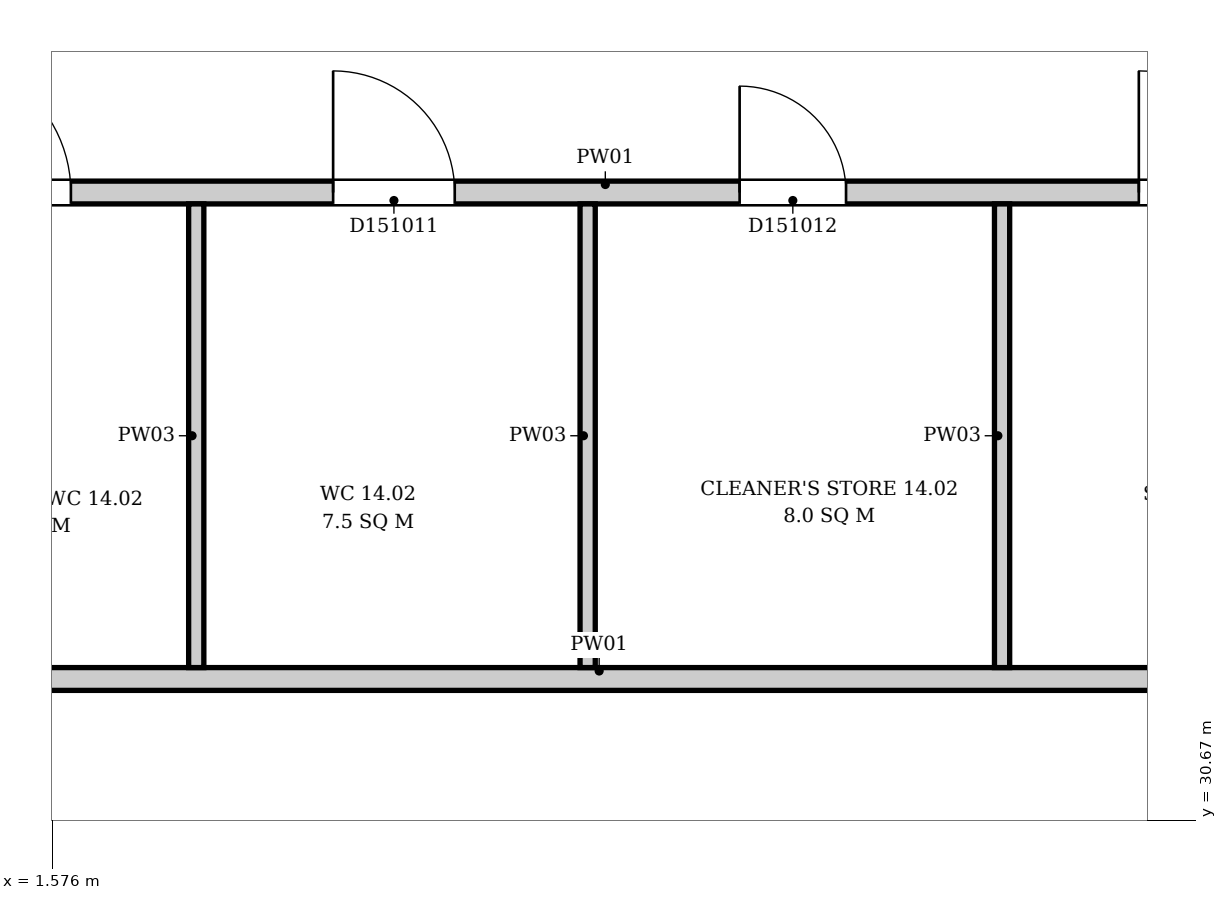
"""IFC4 building model, lengths in metres.
Left out: names, types, materials, properties, quantities, classifications, styles, units other than length and angle.
Written with IfcOpenShell. Run it as: python <this file> out.ifc"""

import sys

from ifc_helpers import new_model, si_unit, direction, frame, frame_2d, origin, place, context, subcontext, project, spatial, rectangle, extrude, element, fill, save


model = new_model("IFC4")
c1 = context("Model", 3, precision=1e-05, world=origin(), true_north=direction((0.0, 1.0)))
c2 = subcontext(c1, "Body", "Model", "MODEL_VIEW")
j1 = project(units=[si_unit("LENGTHUNIT", "METRE"), si_unit("PLANEANGLEUNIT", "RADIAN")], contexts=[c1])
p1 = place(None, origin())
s1 = spatial("IfcSite", under=j1, at=p1, CompositionType="ELEMENT")
p2 = place(p1, origin())
s2 = spatial("IfcBuilding", under=s1, at=p2, CompositionType="ELEMENT")
p3 = place(p2, frame((0.0, 0.0, 69.7)))
s3 = spatial("IfcBuildingStorey", under=s2, at=p3, CompositionType="ELEMENT", Elevation=69.7)
p4 = place(p3, frame((-0.044, 31.6, 0.0), z_axis=(0.0, 0.0, 1.0), x_axis=(1.0, 0.0, 0.0)))
e1 = element("IfcWall", 1, at=p4, inside=s3, PredefinedType="PARTITIONING", context=c2, shape_type="SweptSolid", body=[
    extrude(rectangle(XDim=10.438, YDim=0.15, at=frame_2d((5.219, 0.0))), origin(), (0.0, 0.0, 1.0), 3.9),
])
p5 = place(p3, frame((-0.044, 34.8, 0.0), z_axis=(0.0, 0.0, 1.0), x_axis=(1.0, 0.0, 0.0)))
e2 = element("IfcWall", 2, at=p5, inside=s3, PredefinedType="PARTITIONING", context=c2, shape_type="SweptSolid", body=[
    extrude(rectangle(XDim=10.519, YDim=0.15, at=frame_2d((5.26, 0.0))), origin(), (0.0, 0.0, 1.0), 3.9),
])
p6 = place(p5, frame((0.844, 0.0, 0.0)))
e3 = element("IfcOpeningElement", 3, at=p6, cuts=e2, PredefinedType="OPENING", context=c2, shape_type="SweptSolid", body=[
    extrude(rectangle(XDim=0.9, YDim=2.1, at=frame_2d((0.45, 1.05))), frame((0.0, 0.085, 0.0), z_axis=(0.0, -1.0, 0.0), x_axis=(1.0, 0.0, 0.0)), (0.0, 0.0, 1.0), 0.17),
])
p7 = place(p5, frame((3.469, 0.0, 0.0)))
e4 = element("IfcOpeningElement", 4, at=p7, cuts=e2, PredefinedType="OPENING", context=c2, shape_type="SweptSolid", body=[
    extrude(rectangle(XDim=0.8, YDim=2.1, at=frame_2d((0.4, 1.05))), frame((0.0, 0.085, 0.0), z_axis=(0.0, -1.0, 0.0), x_axis=(1.0, 0.0, 0.0)), (0.0, 0.0, 1.0), 0.17),
])
p8 = place(p5, frame((6.143, 0.0, 0.0)))
e5 = element("IfcOpeningElement", 5, at=p8, cuts=e2, PredefinedType="OPENING", context=c2, shape_type="SweptSolid", body=[
    extrude(rectangle(XDim=0.7, YDim=2.1, at=frame_2d((0.35, 1.05))), frame((0.0, 0.085, 0.0), z_axis=(0.0, -1.0, 0.0), x_axis=(1.0, 0.0, 0.0)), (0.0, 0.0, 1.0), 0.17),
])
p9 = place(p5, frame((8.769, 0.0, 0.0)))
e6 = element("IfcOpeningElement", 6, at=p9, cuts=e2, PredefinedType="OPENING", context=c2, shape_type="SweptSolid", body=[
    extrude(rectangle(XDim=0.8, YDim=2.1, at=frame_2d((0.4, 1.05))), frame((0.0, 0.085, 0.0), z_axis=(0.0, -1.0, 0.0), x_axis=(1.0, 0.0, 0.0)), (0.0, 0.0, 1.0), 0.17),
])
for number, where, z_axis, x_axis in (
    (7, (2.525, 31.675, 0.0), (0.0, 0.0, 1.0), (0.0, 1.0, 0.0)),
    (8, (5.099, 31.675, 0.0), (0.0, 0.0, 1.0), (0.0, 1.0, 0.0)),
    (9, (7.825, 31.675, 0.0), (0.0, 0.0, 1.0), (0.0, 1.0, 0.0)),
):
    element("IfcWall", number, at=place(p3, frame(where, z_axis=z_axis, x_axis=x_axis)), inside=s3, PredefinedType="PARTITIONING", context=c2, shape_type="SweptSolid", body=[
        extrude(rectangle(XDim=3.05, YDim=0.1, at=frame_2d((1.525, 0.0))), origin(), (0.0, 0.0, 1.0), 3.9),
    ])
p10 = place(p6, origin())
e10 = element("IfcDoor", 10, at=p10, inside=s3, OperationType="SINGLE_SWING_RIGHT", PredefinedType="DOOR", context=c2, shape_type="SweptSolid", body=[
    extrude(rectangle(XDim=0.9, YDim=2.1, at=frame_2d((0.45, 1.05))), frame((0.0, 0.025, 0.0), z_axis=(0.0, -1.0, 0.0), x_axis=(1.0, 0.0, 0.0)), (0.0, 0.0, 1.0), 0.05),
])
fill(e3, e10)
p11 = place(p7, origin())
e11 = element("IfcDoor", 11, at=p11, inside=s3, OperationType="SINGLE_SWING_RIGHT", PredefinedType="DOOR", context=c2, shape_type="SweptSolid", body=[
    extrude(rectangle(XDim=0.8, YDim=2.1, at=frame_2d((0.4, 1.05))), frame((0.0, 0.025, 0.0), z_axis=(0.0, -1.0, 0.0), x_axis=(1.0, 0.0, 0.0)), (0.0, 0.0, 1.0), 0.05),
])
fill(e4, e11)
p12 = place(p8, origin())
e12 = element("IfcDoor", 12, at=p12, inside=s3, OperationType="SINGLE_SWING_LEFT", PredefinedType="DOOR", context=c2, shape_type="SweptSolid", body=[
    extrude(rectangle(XDim=0.7, YDim=2.1, at=frame_2d((0.35, 1.05))), frame((0.0, 0.025, 0.0), z_axis=(0.0, -1.0, 0.0), x_axis=(1.0, 0.0, 0.0)), (0.0, 0.0, 1.0), 0.05),
])
fill(e5, e12)
p13 = place(p9, origin())
e13 = element("IfcDoor", 13, at=p13, inside=s3, OperationType="SINGLE_SWING_LEFT", PredefinedType="DOOR", context=c2, shape_type="SweptSolid", body=[
    extrude(rectangle(XDim=0.8, YDim=2.1, at=frame_2d((0.4, 1.05))), frame((0.0, 0.025, 0.0), z_axis=(0.0, -1.0, 0.0), x_axis=(1.0, 0.0, 0.0)), (0.0, 0.0, 1.0), 0.05),
])
fill(e6, e13)
save(model, sys.argv[1])
